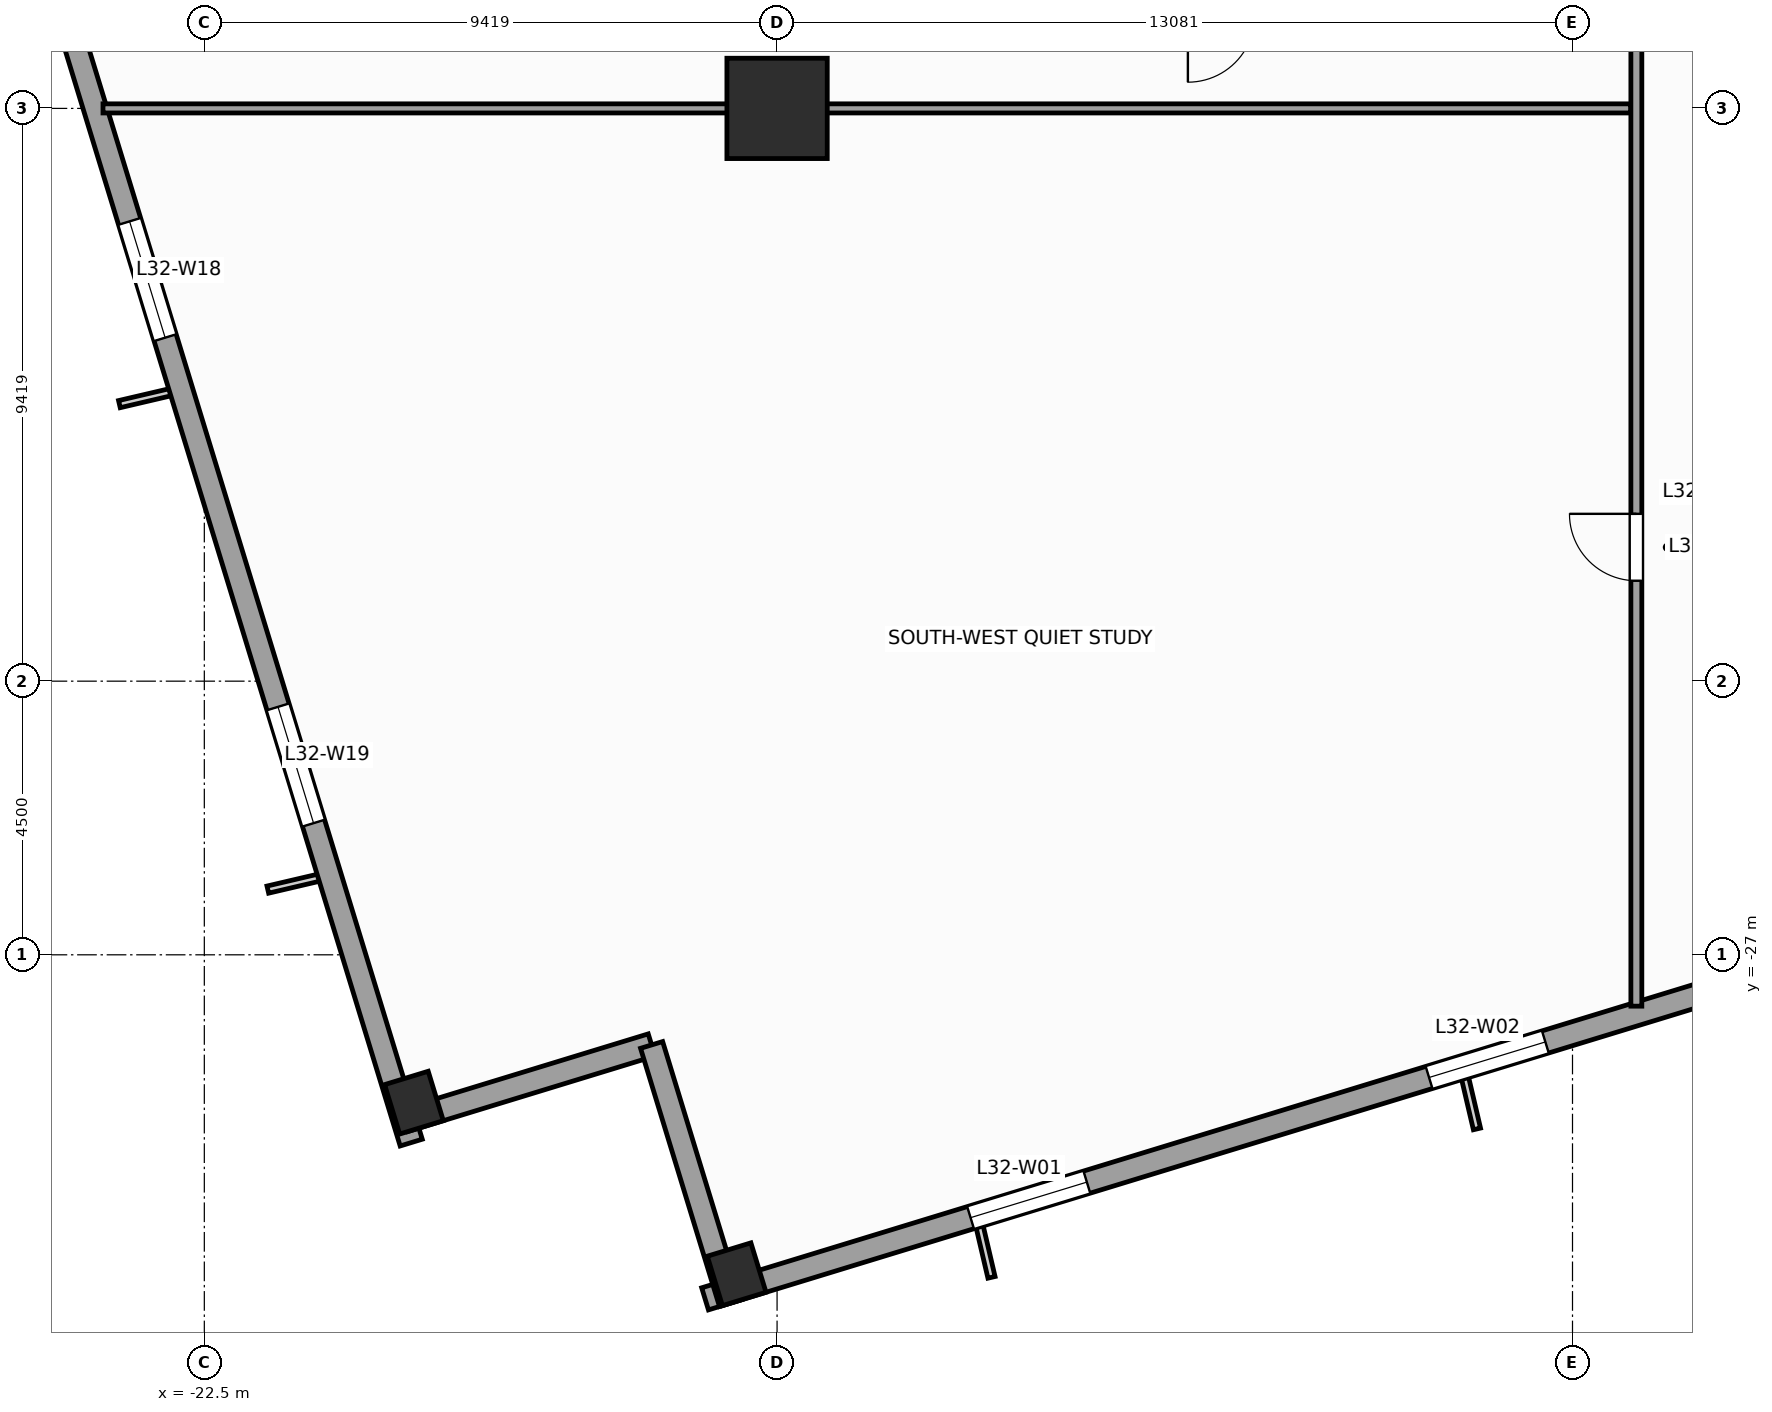
"""IFC4 building model, lengths in metres.
Left out: names, types, materials, properties, quantities, classifications, styles, units other than length and angle.
Written with IfcOpenShell. Run it as: python <this file> out.ifc"""

import sys

from ifc_helpers import new_model, si_unit, direction, frame, frame_2d, origin, origin_2d, place, context, subcontext, project, spatial, rectangle, extrude, source, transform, mapped, element, fill, save


model = new_model("IFC4")
c1 = context("Model", 3, precision=1e-05, world=origin(), true_north=direction((0.0, 1.0)))
c2 = subcontext(c1, "Body", "Model", "MODEL_VIEW")
j1 = project(units=[si_unit("LENGTHUNIT", "METRE"), si_unit("PLANEANGLEUNIT", "RADIAN")], contexts=[c1])
p1 = place(None, origin())
s1 = spatial("IfcSite", under=j1, at=p1, CompositionType="ELEMENT")
p2 = place(p1, origin())
s2 = spatial("IfcBuilding", under=s1, at=p2, CompositionType="ELEMENT")
p3 = place(p2, frame((0.0, 0.0, 135.2)))
s3 = spatial("IfcBuildingStorey", under=s2, at=p3, CompositionType="ELEMENT", Elevation=135.2)
m1 = source(origin(), c2, "Body", "SweptSolid", [
    extrude(rectangle(XDim=1.65, YDim=1.65, at=origin_2d()), origin(), (0.0, 0.0, 1.0), 4.0),
])
p4 = place(p3, frame((-13.081, -13.081, 0.0), z_axis=(0.0, 0.0, 1.0), x_axis=(1.0, 0.0, 0.0)))
e1 = element("IfcColumn", 1, at=p4, inside=s3, PredefinedType="COLUMN", context=c2, shape_type="MappedRepresentation", body=[
    mapped(m1, transform((0.0, 0.0, 0.0), scale=1.0)),
])
m2 = source(origin(), c2, "Body", "SweptSolid", [
    extrude(rectangle(XDim=0.75, YDim=0.85, at=origin_2d()), origin(), (0.0, 0.0, 1.0), 4.0),
])
for number, where, z_axis, x_axis in (
    (2, (-13.746, -32.253, 0.0), (0.0, 0.0, 1.0), (0.956, 0.292, 0.0)),
    (3, (-19.052, -29.431, 0.0), (0.0, 0.0, 1.0), (0.956, 0.292, 0.0)),
):
    element("IfcColumn", number, at=place(p3, frame(where, z_axis=z_axis, x_axis=x_axis)), inside=s3, PredefinedType="COLUMN", context=c2, shape_type="MappedRepresentation", body=[
        mapped(m2, transform((0.0, 0.0, 0.0), scale=1.0)),
    ])
p5 = place(p3, frame((-14.265, -32.658, 0.0), z_axis=(0.0, 0.0, 1.0), x_axis=(0.956304320851, 0.292373127906, 0.0)))
e4 = element("IfcWall", 4, at=p5, inside=s3, PredefinedType="STANDARD", context=c2, shape_type="SweptSolid", body=[
    extrude(rectangle(XDim=46.38, YDim=0.38, at=frame_2d((23.19, 0.0))), origin(), (0.0, 0.0, 1.0), 2.2),
])
p6 = place(p5, frame((29.115, 0.0, 0.0)))
e5 = element("IfcOpeningElement", 5, at=p6, cuts=e4, PredefinedType="OPENING", context=c2, shape_type="SweptSolid", body=[
    extrude(rectangle(XDim=1.05, YDim=2.02, at=frame_2d((0.525, 1.01))), frame((0.0, 0.2, 0.0), z_axis=(0.0, -1.0, 0.0), x_axis=(1.0, 0.0, 0.0)), (0.0, 0.0, 1.0), 0.4),
])
p7 = place(p5, frame((4.566, 0.0, 0.67)))
e6 = element("IfcOpeningElement", 6, at=p7, cuts=e4, PredefinedType="OPENING", context=c2, shape_type="SweptSolid", body=[
    extrude(rectangle(XDim=2.0, YDim=1.45, at=frame_2d((1.0, 0.725))), frame((0.0, 0.2, 0.0), z_axis=(0.0, -1.0, 0.0), x_axis=(1.0, 0.0, 0.0)), (0.0, 0.0, 1.0), 0.4),
])
p8 = place(p5, frame((12.45, 0.0, 0.67)))
e7 = element("IfcOpeningElement", 7, at=p8, cuts=e4, PredefinedType="OPENING", context=c2, shape_type="SweptSolid", body=[
    extrude(rectangle(XDim=2.0, YDim=1.45, at=frame_2d((1.0, 0.725))), frame((0.0, 0.2, 0.0), z_axis=(0.0, -1.0, 0.0), x_axis=(1.0, 0.0, 0.0)), (0.0, 0.0, 1.0), 0.4),
])
p9 = place(p5, frame((19.762, 0.0, 0.67)))
e8 = element("IfcOpeningElement", 8, at=p9, cuts=e4, PredefinedType="OPENING", context=c2, shape_type="SweptSolid", body=[
    extrude(rectangle(XDim=2.0, YDim=1.45, at=frame_2d((1.0, 0.725))), frame((0.0, 0.2, 0.0), z_axis=(0.0, -1.0, 0.0), x_axis=(1.0, 0.0, 0.0)), (0.0, 0.0, 1.0), 0.4),
])
p10 = place(p5, frame((31.288, 0.0, 0.67)))
e9 = element("IfcOpeningElement", 9, at=p10, cuts=e4, PredefinedType="OPENING", context=c2, shape_type="SweptSolid", body=[
    extrude(rectangle(XDim=2.0, YDim=1.45, at=frame_2d((1.0, 0.725))), frame((0.0, 0.2, 0.0), z_axis=(0.0, -1.0, 0.0), x_axis=(1.0, 0.0, 0.0)), (0.0, 0.0, 1.0), 0.4),
])
p11 = place(p5, frame((38.887, 0.0, 0.67)))
e10 = element("IfcOpeningElement", 10, at=p11, cuts=e4, PredefinedType="OPENING", context=c2, shape_type="SweptSolid", body=[
    extrude(rectangle(XDim=2.0, YDim=1.45, at=frame_2d((1.0, 0.725))), frame((0.0, 0.2, 0.0), z_axis=(0.0, -1.0, 0.0), x_axis=(1.0, 0.0, 0.0)), (0.0, 0.0, 1.0), 0.4),
])
p12 = place(p3, frame((-32.658, 14.265, 0.0), z_axis=(0.0, 0.0, 1.0), x_axis=(0.292373127906, -0.956304320851, 0.0)))
e11 = element("IfcWall", 11, at=p12, inside=s3, PredefinedType="STANDARD", context=c2, shape_type="SweptSolid", body=[
    extrude(rectangle(XDim=46.38, YDim=0.38, at=frame_2d((23.19, 0.0))), origin(), (0.0, 0.0, 1.0), 2.2),
])
p13 = place(p12, frame((4.566, 0.0, 0.67)))
e12 = element("IfcOpeningElement", 12, at=p13, cuts=e11, PredefinedType="OPENING", context=c2, shape_type="SweptSolid", body=[
    extrude(rectangle(XDim=2.0, YDim=1.45, at=frame_2d((1.0, 0.725))), frame((0.0, 0.2, 0.0), z_axis=(0.0, -1.0, 0.0), x_axis=(1.0, 0.0, 0.0)), (0.0, 0.0, 1.0), 0.4),
])
p14 = place(p12, frame((14.7, 0.0, 0.67)))
e13 = element("IfcOpeningElement", 13, at=p14, cuts=e11, PredefinedType="OPENING", context=c2, shape_type="SweptSolid", body=[
    extrude(rectangle(XDim=2.0, YDim=1.45, at=frame_2d((1.0, 0.725))), frame((0.0, 0.2, 0.0), z_axis=(0.0, -1.0, 0.0), x_axis=(1.0, 0.0, 0.0)), (0.0, 0.0, 1.0), 0.4),
])
p15 = place(p12, frame((30.538, 0.0, 0.67)))
e14 = element("IfcOpeningElement", 14, at=p15, cuts=e11, PredefinedType="OPENING", context=c2, shape_type="SweptSolid", body=[
    extrude(rectangle(XDim=2.0, YDim=1.45, at=frame_2d((1.0, 0.725))), frame((0.0, 0.2, 0.0), z_axis=(0.0, -1.0, 0.0), x_axis=(1.0, 0.0, 0.0)), (0.0, 0.0, 1.0), 0.4),
])
p16 = place(p12, frame((38.887, 0.0, 0.67)))
e15 = element("IfcOpeningElement", 15, at=p16, cuts=e11, PredefinedType="OPENING", context=c2, shape_type="SweptSolid", body=[
    extrude(rectangle(XDim=2.0, YDim=1.45, at=frame_2d((1.0, 0.725))), frame((0.0, 0.2, 0.0), z_axis=(0.0, -1.0, 0.0), x_axis=(1.0, 0.0, 0.0)), (0.0, 0.0, 1.0), 0.4),
])
p17 = place(p3, frame((-19.208, -29.725, 0.0), z_axis=(0.0, 0.0, 1.0), x_axis=(0.956312764915, 0.292345507338, 0.0)))
e16 = element("IfcWall", 16, at=p17, inside=s3, PredefinedType="STANDARD", context=c2, shape_type="SweptSolid", body=[
    extrude(rectangle(XDim=4.25, YDim=0.38, at=frame_2d((2.125, 0.0))), origin(), (0.0, 0.0, 1.0), 3.6),
])
p18 = place(p3, frame((-15.144, -28.482, 0.0), z_axis=(0.0, 0.0, 1.0), x_axis=(0.292373601522, -0.956304176051, 0.0)))
e17 = element("IfcWall", 17, at=p18, inside=s3, PredefinedType="STANDARD", context=c2, shape_type="SweptSolid", body=[
    extrude(rectangle(XDim=4.44, YDim=0.38, at=frame_2d((2.22, 0.0))), origin(), (0.0, 0.0, 1.0), 2.2),
])
p19 = place(p3, frame((1.05, -27.845, 0.0), z_axis=(0.0, 0.0, 1.0), x_axis=(0.0, 1.0, 0.0)))
e18 = element("IfcWall", 18, at=p19, inside=s3, PredefinedType="PARTITIONING", context=c2, shape_type="SweptSolid", body=[
    extrude(rectangle(XDim=16.195, YDim=0.18, at=frame_2d((8.097, 0.0))), origin(), (0.0, 0.0, 1.0), 3.6),
])
p20 = place(p19, frame((6.996, 0.0, 0.0)))
e19 = element("IfcOpeningElement", 19, at=p20, cuts=e18, PredefinedType="OPENING", context=c2, shape_type="SweptSolid", body=[
    extrude(rectangle(XDim=1.1, YDim=2.2, at=frame_2d((0.55, 1.1))), frame((0.0, 0.1, 0.0), z_axis=(0.0, -1.0, 0.0), x_axis=(1.0, 0.0, 0.0)), (0.0, 0.0, 1.0), 0.2),
])
p21 = place(p3, frame((-24.167, -13.081, 0.0), z_axis=(0.0, 0.0, 1.0), x_axis=(1.0, 0.0, 0.0)))
e20 = element("IfcWall", 20, at=p21, inside=s3, PredefinedType="PARTITIONING", context=c2, shape_type="SweptSolid", body=[
    extrude(rectangle(XDim=25.122, YDim=0.15, at=frame_2d((12.561, 0.0))), origin(), (0.0, 0.0, 1.0), 2.2),
])
m3 = source(origin(), c2, "Body", "SweptSolid", [
    extrude(rectangle(XDim=2.0, YDim=1.45, at=frame_2d((1.0, 0.725))), frame((0.0, 0.03, 0.0), z_axis=(0.0, -1.0, 0.0), x_axis=(1.0, 0.0, 0.0)), (0.0, 0.0, 1.0), 0.06),
])
p22 = place(p7, origin())
e21 = element("IfcWindow", 21, at=p22, inside=s3, PartitioningType="SINGLE_PANEL", PredefinedType="WINDOW", context=c2, shape_type="MappedRepresentation", body=[
    mapped(m3, transform((0.0, 0.0, 0.0), scale=1.0)),
])
fill(e6, e21)
p23 = place(p8, origin())
e22 = element("IfcWindow", 22, at=p23, inside=s3, PartitioningType="SINGLE_PANEL", PredefinedType="WINDOW", context=c2, shape_type="MappedRepresentation", body=[
    mapped(m3, transform((0.0, 0.0, 0.0), scale=1.0)),
])
fill(e7, e22)
p24 = place(p15, origin())
e23 = element("IfcWindow", 23, at=p24, inside=s3, PartitioningType="SINGLE_PANEL", PredefinedType="WINDOW", context=c2, shape_type="MappedRepresentation", body=[
    mapped(m3, transform((0.0, 0.0, 0.0), scale=1.0)),
])
fill(e14, e23)
p25 = place(p16, origin())
e24 = element("IfcWindow", 24, at=p25, inside=s3, PartitioningType="SINGLE_PANEL", PredefinedType="WINDOW", context=c2, shape_type="MappedRepresentation", body=[
    mapped(m3, transform((0.0, 0.0, 0.0), scale=1.0)),
])
fill(e15, e24)
m4 = source(origin(), c2, "Body", "SweptSolid", [
    extrude(rectangle(XDim=1.1, YDim=2.2, at=frame_2d((0.55, 1.1))), frame((0.0, 0.025, 0.0), z_axis=(0.0, -1.0, 0.0), x_axis=(1.0, 0.0, 0.0)), (0.0, 0.0, 1.0), 0.05),
])
p26 = place(p20, origin())
e25 = element("IfcDoor", 25, at=p26, inside=s3, OperationType="SINGLE_SWING_RIGHT", PredefinedType="DOOR", context=c2, shape_type="MappedRepresentation", body=[
    mapped(m4, transform((0.0, 0.0, 0.0), scale=1.0)),
])
fill(e19, e25)
save(model, sys.argv[1])
